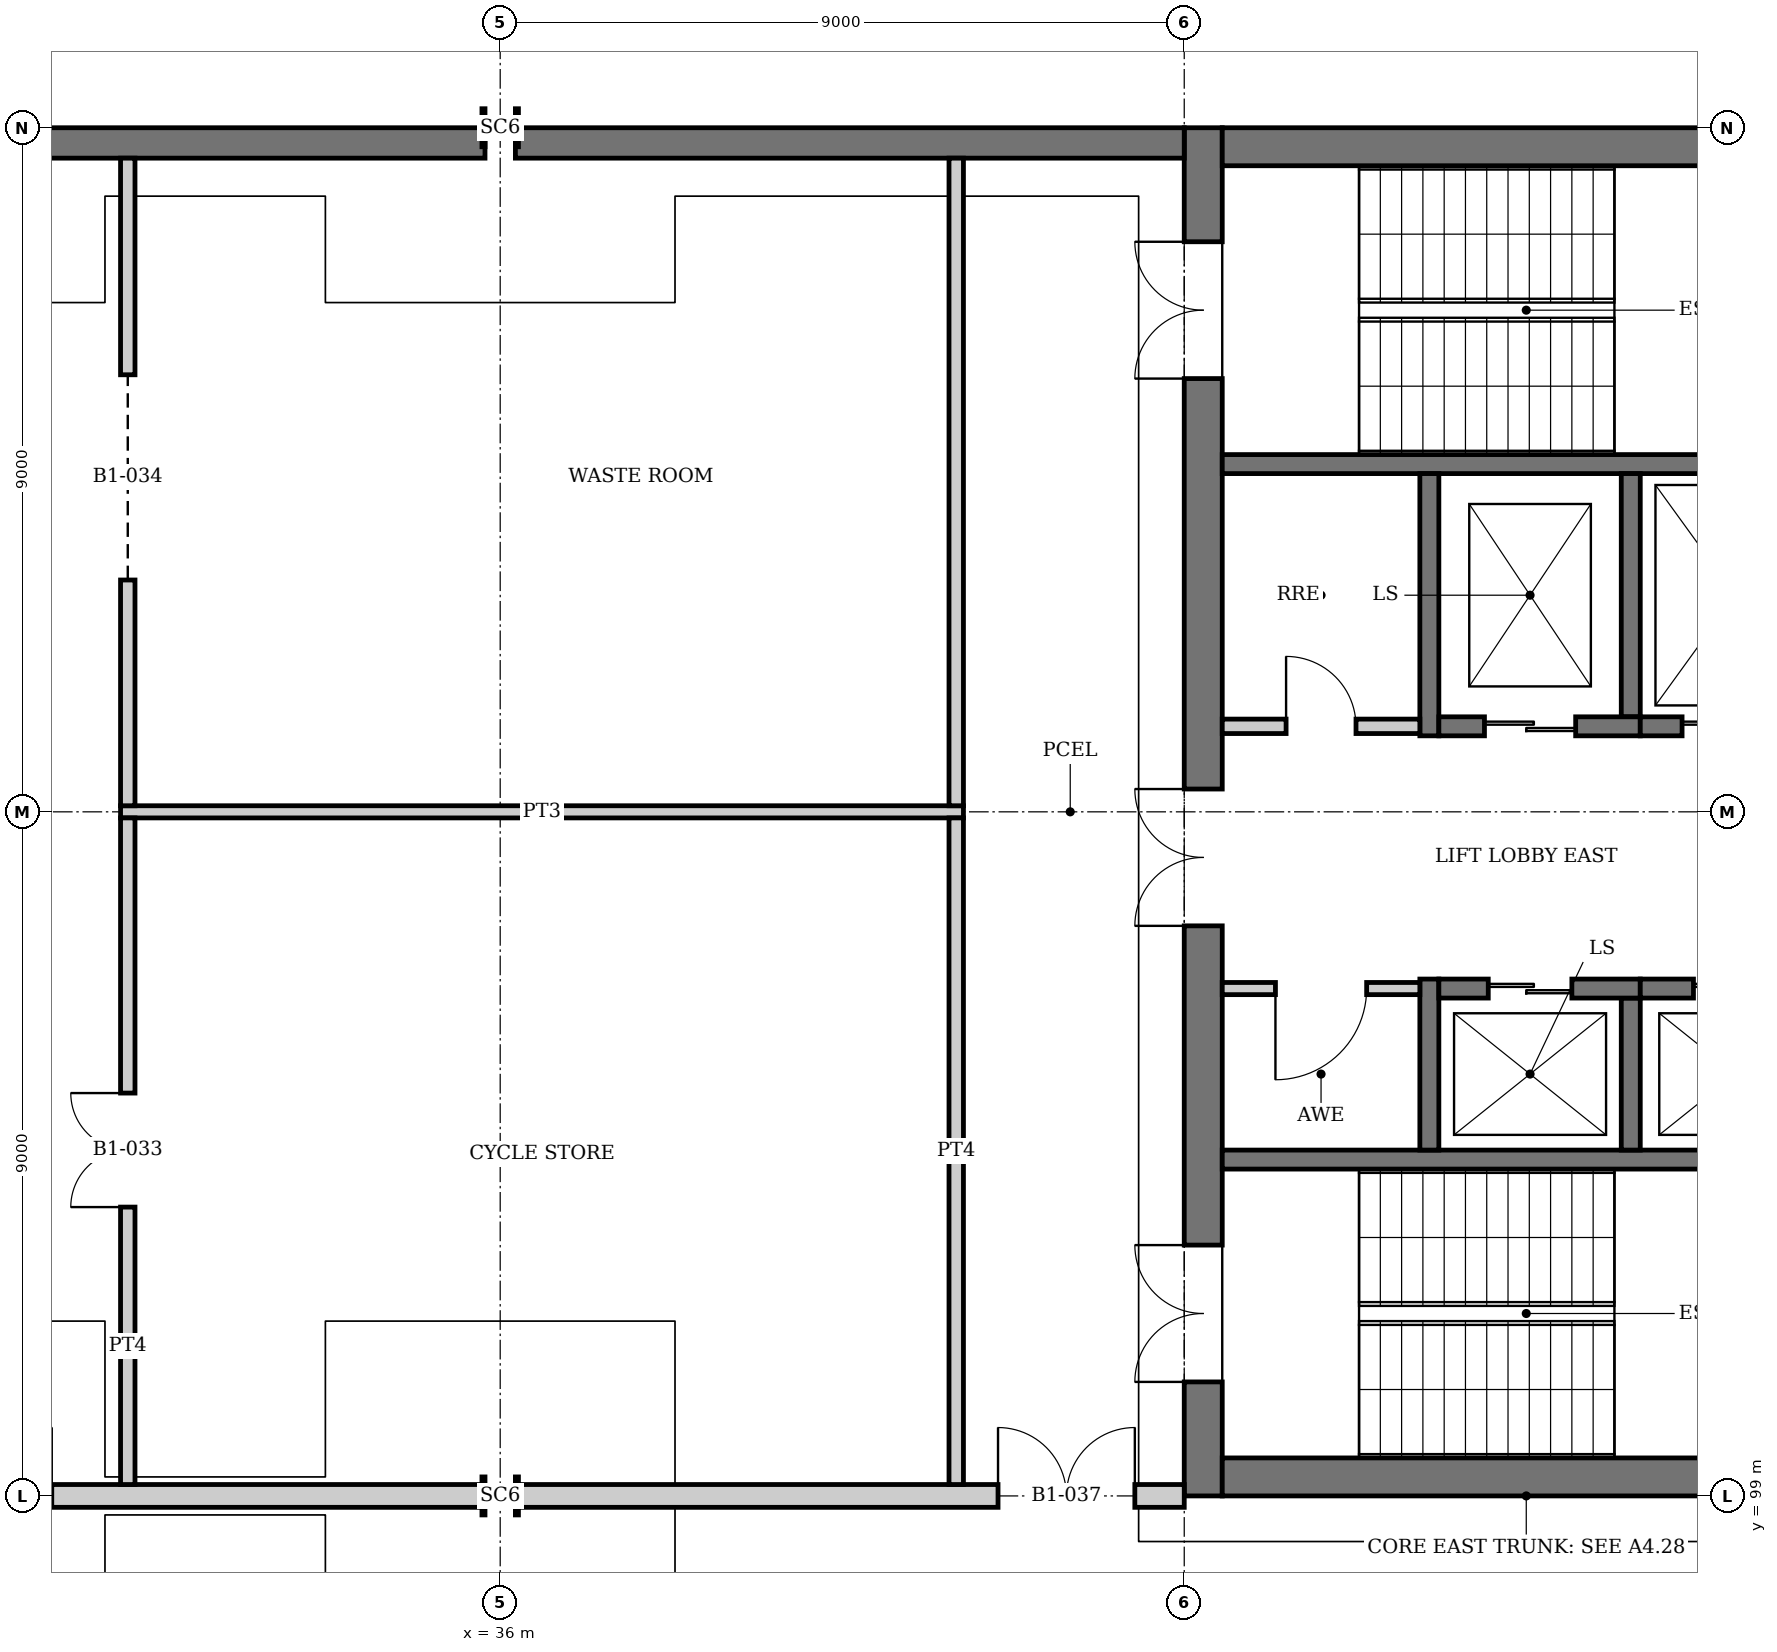
"""IFC4 building model, lengths in metres.
Left out: names, types, materials, properties, quantities, classifications, styles, units other than length and angle.
Written with IfcOpenShell. Run it as: python <this file> out.ifc"""

import sys

from ifc_helpers import new_model, si_unit, direction, frame, frame_2d, origin, origin_2d, place, context, subcontext, project, spatial, rectangle, i_section, extrude, element, fill, save


model = new_model("IFC4")
c1 = context("Model", 3, precision=1e-05, world=origin(), true_north=direction((0.0, 1.0)))
c2 = subcontext(c1, "Body", "Model", "MODEL_VIEW")
j1 = project(units=[si_unit("LENGTHUNIT", "METRE"), si_unit("PLANEANGLEUNIT", "RADIAN")], contexts=[c1])
p1 = place(None, origin())
s1 = spatial("IfcSite", under=j1, at=p1, CompositionType="ELEMENT")
p2 = place(p1, origin())
s2 = spatial("IfcBuilding", under=s1, at=p2, CompositionType="ELEMENT")
p3 = place(p2, frame((0.0, 0.0, -4.5)))
s3 = spatial("IfcBuildingStorey", under=s2, at=p3, CompositionType="ELEMENT", Elevation=-4.5)
for number, where, z_axis, x_axis in (
    (1, (36.0, 99.0, 0.0), (0.0, 0.0, 1.0), (0.0, 1.0, 0.0)),
    (2, (36.0, 117.0, 0.0), (0.0, 0.0, 1.0), (0.0, 1.0, 0.0)),
):
    element("IfcColumn", number, at=place(p3, frame(where, z_axis=z_axis, x_axis=x_axis)), inside=s3, PredefinedType="COLUMN", context=c2, shape_type="SweptSolid", body=[
        extrude(i_section(OverallWidth=0.5, OverallDepth=0.48, WebThickness=0.04, FlangeThickness=0.04, at=origin_2d()), origin(), (0.0, 0.0, 1.0), 4.5),
    ])
p4 = place(p3, frame((45.25, 99.0, 0.0), z_axis=(0.0, 0.0, 1.0), x_axis=(0.0, 1.0, 0.0)))
e3 = element("IfcWall", 3, at=p4, inside=s3, PredefinedType="SHEAR", context=c2, shape_type="SweptSolid", body=[
    extrude(rectangle(XDim=18.0, YDim=0.5, at=frame_2d((9.0, 0.0))), origin(), (0.0, 0.0, 1.0), 4.5),
])
p5 = place(p4, frame((1.5, 0.0, 0.0)))
e4 = element("IfcOpeningElement", 4, at=p5, cuts=e3, PredefinedType="OPENING", context=c2, shape_type="SweptSolid", body=[
    extrude(rectangle(XDim=1.8, YDim=2.1, at=frame_2d((0.9, 1.05))), frame((0.0, 0.26, 0.0), z_axis=(0.0, -1.0, 0.0), x_axis=(1.0, 0.0, 0.0)), (0.0, 0.0, 1.0), 0.52),
])
p6 = place(p4, frame((14.7, 0.0, 0.0)))
e5 = element("IfcOpeningElement", 5, at=p6, cuts=e3, PredefinedType="OPENING", context=c2, shape_type="SweptSolid", body=[
    extrude(rectangle(XDim=1.8, YDim=2.1, at=frame_2d((0.9, 1.05))), frame((0.0, 0.26, 0.0), z_axis=(0.0, -1.0, 0.0), x_axis=(1.0, 0.0, 0.0)), (0.0, 0.0, 1.0), 0.52),
])
p7 = place(p4, frame((7.5, 0.0, 0.0)))
e6 = element("IfcOpeningElement", 6, at=p7, cuts=e3, PredefinedType="OPENING", context=c2, shape_type="SweptSolid", body=[
    extrude(rectangle(XDim=1.8, YDim=2.1, at=frame_2d((0.9, 1.05))), frame((0.0, 0.26, 0.0), z_axis=(0.0, -1.0, 0.0), x_axis=(1.0, 0.0, 0.0)), (0.0, 0.0, 1.0), 0.52),
])
for number, where, z_axis, x_axis in (
    (7, (45.5, 99.25, 0.0), (0.0, 0.0, 1.0), (1.0, 0.0, 0.0)),
    (8, (45.5, 116.75, 0.0), (0.0, 0.0, 1.0), (1.0, 0.0, 0.0)),
):
    element("IfcWall", number, at=place(p3, frame(where, z_axis=z_axis, x_axis=x_axis)), inside=s3, PredefinedType="SHEAR", context=c2, shape_type="SweptSolid", body=[
        extrude(rectangle(XDim=8.0, YDim=0.5, at=frame_2d((4.0, 0.0))), origin(), (0.0, 0.0, 1.0), 4.5),
    ])
p8 = place(p3, frame((27.2, 116.8, 0.0), z_axis=(0.0, 0.0, 1.0), x_axis=(1.0, 0.0, 0.0)))
e9 = element("IfcWall", 9, at=p8, inside=s3, PredefinedType="SOLIDWALL", context=c2, shape_type="SweptSolid", body=[
    extrude(rectangle(XDim=8.6, YDim=0.4, at=frame_2d((4.3, 0.0))), origin(), (0.0, 0.0, 1.0), 4.5),
])
p9 = place(p3, frame((36.2, 116.8, 0.0), z_axis=(0.0, 0.0, 1.0), x_axis=(1.0, 0.0, 0.0)))
e10 = element("IfcWall", 10, at=p9, inside=s3, PredefinedType="SOLIDWALL", context=c2, shape_type="SweptSolid", body=[
    extrude(rectangle(XDim=8.8, YDim=0.4, at=frame_2d((4.4, 0.0))), origin(), (0.0, 0.0, 1.0), 4.5),
])
p10 = place(p3, frame((27.25, 99.0, 0.0), z_axis=(0.0, 0.0, 1.0), x_axis=(1.0, 0.0, 0.0)))
e11 = element("IfcWall", 11, at=p10, inside=s3, PredefinedType="PARTITIONING", context=c2, shape_type="SweptSolid", body=[
    extrude(rectangle(XDim=8.5, YDim=0.3, at=frame_2d((4.25, 0.0))), origin(), (0.0, 0.0, 1.0), 3.34),
])
p11 = place(p10, frame((1.05, 0.0, 0.0)))
e12 = element("IfcOpeningElement", 12, at=p11, cuts=e11, PredefinedType="OPENING", context=c2, shape_type="SweptSolid", body=[
    extrude(rectangle(XDim=1.8, YDim=2.1, at=frame_2d((0.9, 1.05))), frame((0.0, 0.16, 0.0), z_axis=(0.0, -1.0, 0.0), x_axis=(1.0, 0.0, 0.0)), (0.0, 0.0, 1.0), 0.32),
])
p12 = place(p3, frame((36.25, 99.0, 0.0), z_axis=(0.0, 0.0, 1.0), x_axis=(1.0, 0.0, 0.0)))
e13 = element("IfcWall", 13, at=p12, inside=s3, PredefinedType="PARTITIONING", context=c2, shape_type="SweptSolid", body=[
    extrude(rectangle(XDim=8.75, YDim=0.3, at=frame_2d((4.375, 0.0))), origin(), (0.0, 0.0, 1.0), 3.34),
])
p13 = place(p12, frame((6.3, 0.0, 0.0)))
e14 = element("IfcOpeningElement", 14, at=p13, cuts=e13, PredefinedType="OPENING", context=c2, shape_type="SweptSolid", body=[
    extrude(rectangle(XDim=1.8, YDim=2.1, at=frame_2d((0.9, 1.05))), frame((0.0, 0.16, 0.0), z_axis=(0.0, -1.0, 0.0), x_axis=(1.0, 0.0, 0.0)), (0.0, 0.0, 1.0), 0.32),
])
p14 = place(p3, frame((31.005, 108.0, 0.0), z_axis=(0.0, 0.0, 1.0), x_axis=(1.0, 0.0, 0.0)))
e15 = element("IfcWall", 15, at=p14, inside=s3, PredefinedType="PARTITIONING", context=c2, shape_type="SweptSolid", body=[
    extrude(rectangle(XDim=11.09, YDim=0.16, at=frame_2d((5.545, 0.0))), origin(), (0.0, 0.0, 1.0), 3.35),
])
p15 = place(p3, frame((31.1, 99.15, 0.0), z_axis=(0.0, 0.0, 1.0), x_axis=(0.0, 1.0, 0.0)))
e16 = element("IfcWall", 16, at=p15, inside=s3, PredefinedType="PARTITIONING", context=c2, shape_type="SweptSolid", body=[
    extrude(rectangle(XDim=8.77, YDim=0.19, at=frame_2d((4.385, 0.0))), origin(), (0.0, 0.0, 1.0), 3.34),
])
p16 = place(p15, frame((3.65, 0.0, 0.0)))
e17 = element("IfcOpeningElement", 17, at=p16, cuts=e16, PredefinedType="OPENING", context=c2, shape_type="SweptSolid", body=[
    extrude(rectangle(XDim=1.5, YDim=2.1, at=frame_2d((0.75, 1.05))), frame((0.0, 0.105, 0.0), z_axis=(0.0, -1.0, 0.0), x_axis=(1.0, 0.0, 0.0)), (0.0, 0.0, 1.0), 0.21),
])
p17 = place(p3, frame((31.1, 108.08, 0.0), z_axis=(0.0, 0.0, 1.0), x_axis=(0.0, 1.0, 0.0)))
e18 = element("IfcWall", 18, at=p17, inside=s3, PredefinedType="PARTITIONING", context=c2, shape_type="SweptSolid", body=[
    extrude(rectangle(XDim=8.52, YDim=0.19, at=frame_2d((4.26, 0.0))), origin(), (0.0, 0.0, 1.0), 4.25),
])
p18 = place(p17, frame((2.97, 0.0, 0.0)))
e19 = element("IfcOpeningElement", 19, at=p18, cuts=e18, PredefinedType="OPENING", context=c2, shape_type="SweptSolid", body=[
    extrude(rectangle(XDim=2.7, YDim=3.0, at=frame_2d((1.35, 1.5))), frame((0.0, 0.105, 0.0), z_axis=(0.0, -1.0, 0.0), x_axis=(1.0, 0.0, 0.0)), (0.0, 0.0, 1.0), 0.21),
])
p19 = place(p3, frame((42.0, 99.15, 0.0), z_axis=(0.0, 0.0, 1.0), x_axis=(0.0, 1.0, 0.0)))
e20 = element("IfcWall", 20, at=p19, inside=s3, PredefinedType="PARTITIONING", context=c2, shape_type="SweptSolid", body=[
    extrude(rectangle(XDim=8.77, YDim=0.19, at=frame_2d((4.385, 0.0))), origin(), (0.0, 0.0, 1.0), 3.34),
])
p20 = place(p3, frame((42.0, 108.08, 0.0), z_axis=(0.0, 0.0, 1.0), x_axis=(0.0, 1.0, 0.0)))
e21 = element("IfcWall", 21, at=p20, inside=s3, PredefinedType="PARTITIONING", context=c2, shape_type="SweptSolid", body=[
    extrude(rectangle(XDim=8.52, YDim=0.19, at=frame_2d((4.26, 0.0))), origin(), (0.0, 0.0, 1.0), 4.25),
])
for number, where, z_axis, x_axis in (
    (22, (45.5, 103.425, 0.0), (0.0, 0.0, 1.0), (1.0, 0.0, 0.0)),
    (23, (45.5, 112.575, 0.0), (0.0, 0.0, 1.0), (1.0, 0.0, 0.0)),
):
    element("IfcWall", number, at=place(p3, frame(where, z_axis=z_axis, x_axis=x_axis)), inside=s3, PredefinedType="SOLIDWALL", context=c2, shape_type="SweptSolid", body=[
        extrude(rectangle(XDim=8.0, YDim=0.25, at=frame_2d((4.0, 0.0))), origin(), (0.0, 0.0, 1.0), 4.25),
    ])
p21 = place(p3, frame((48.225, 103.55, 0.0), z_axis=(0.0, 0.0, 1.0), x_axis=(0.0, 1.0, 0.0)))
e24 = element("IfcWall", 24, at=p21, inside=s3, PredefinedType="SOLIDWALL", context=c2, shape_type="SweptSolid", body=[
    extrude(rectangle(XDim=2.25, YDim=0.25, at=frame_2d((1.125, 0.0))), origin(), (0.0, 0.0, 1.0), 4.5),
])
p22 = place(p3, frame((50.875, 103.55, 0.0), z_axis=(0.0, 0.0, 1.0), x_axis=(0.0, 1.0, 0.0)))
e25 = element("IfcWall", 25, at=p22, inside=s3, PredefinedType="SOLIDWALL", context=c2, shape_type="SweptSolid", body=[
    extrude(rectangle(XDim=2.0, YDim=0.25, at=frame_2d((1.0, 0.0))), origin(), (0.0, 0.0, 1.0), 4.5),
])
p23 = place(p3, frame((48.35, 105.675, 0.0), z_axis=(0.0, 0.0, 1.0), x_axis=(1.0, 0.0, 0.0)))
e26 = element("IfcWall", 26, at=p23, inside=s3, PredefinedType="SOLIDWALL", context=c2, shape_type="SweptSolid", body=[
    extrude(rectangle(XDim=2.65, YDim=0.25, at=frame_2d((1.325, 0.0))), origin(), (0.0, 0.0, 1.0), 4.5),
])
p24 = place(p23, frame((0.65, 0.0, 0.0)))
e27 = element("IfcOpeningElement", 27, at=p24, cuts=e26, PredefinedType="OPENING", context=c2, shape_type="SweptSolid", body=[
    extrude(rectangle(XDim=1.1, YDim=2.1, at=frame_2d((0.55, 1.05))), frame((0.0, 0.135, 0.0), z_axis=(0.0, -1.0, 0.0), x_axis=(1.0, 0.0, 0.0)), (0.0, 0.0, 1.0), 0.27),
])
p25 = place(p3, frame((51.0, 105.675, 0.0), z_axis=(0.0, 0.0, 1.0), x_axis=(1.0, 0.0, 0.0)))
e28 = element("IfcWall", 28, at=p25, inside=s3, PredefinedType="SOLIDWALL", context=c2, shape_type="SweptSolid", body=[
    extrude(rectangle(XDim=2.5, YDim=0.25, at=frame_2d((1.25, 0.0))), origin(), (0.0, 0.0, 1.0), 4.5),
])
p26 = place(p25, frame((0.7, 0.0, 0.0)))
e29 = element("IfcOpeningElement", 29, at=p26, cuts=e28, PredefinedType="OPENING", context=c2, shape_type="SweptSolid", body=[
    extrude(rectangle(XDim=1.1, YDim=2.1, at=frame_2d((0.55, 1.05))), frame((0.0, 0.135, 0.0), z_axis=(0.0, -1.0, 0.0), x_axis=(1.0, 0.0, 0.0)), (0.0, 0.0, 1.0), 0.27),
])
p27 = place(p3, frame((48.225, 109.0, 0.0), z_axis=(0.0, 0.0, 1.0), x_axis=(0.0, 1.0, 0.0)))
e30 = element("IfcWall", 30, at=p27, inside=s3, PredefinedType="SOLIDWALL", context=c2, shape_type="SweptSolid", body=[
    extrude(rectangle(XDim=3.45, YDim=0.25, at=frame_2d((1.725, 0.0))), origin(), (0.0, 0.0, 1.0), 4.5),
])
p28 = place(p3, frame((50.875, 109.25, 0.0), z_axis=(0.0, 0.0, 1.0), x_axis=(0.0, 1.0, 0.0)))
e31 = element("IfcWall", 31, at=p28, inside=s3, PredefinedType="SOLIDWALL", context=c2, shape_type="SweptSolid", body=[
    extrude(rectangle(XDim=3.2, YDim=0.25, at=frame_2d((1.6, 0.0))), origin(), (0.0, 0.0, 1.0), 4.5),
])
p29 = place(p3, frame((48.35, 109.125, 0.0), z_axis=(0.0, 0.0, 1.0), x_axis=(1.0, 0.0, 0.0)))
e32 = element("IfcWall", 32, at=p29, inside=s3, PredefinedType="SOLIDWALL", context=c2, shape_type="SweptSolid", body=[
    extrude(rectangle(XDim=2.65, YDim=0.25, at=frame_2d((1.325, 0.0))), origin(), (0.0, 0.0, 1.0), 4.5),
])
p30 = place(p29, frame((0.6, 0.0, 0.0)))
e33 = element("IfcOpeningElement", 33, at=p30, cuts=e32, PredefinedType="OPENING", context=c2, shape_type="SweptSolid", body=[
    extrude(rectangle(XDim=1.2, YDim=2.1, at=frame_2d((0.6, 1.05))), frame((0.0, 0.135, 0.0), z_axis=(0.0, -1.0, 0.0), x_axis=(1.0, 0.0, 0.0)), (0.0, 0.0, 1.0), 0.27),
])
p31 = place(p3, frame((51.0, 109.125, 0.0), z_axis=(0.0, 0.0, 1.0), x_axis=(1.0, 0.0, 0.0)))
e34 = element("IfcWall", 34, at=p31, inside=s3, PredefinedType="SOLIDWALL", context=c2, shape_type="SweptSolid", body=[
    extrude(rectangle(XDim=2.5, YDim=0.25, at=frame_2d((1.25, 0.0))), origin(), (0.0, 0.0, 1.0), 4.5),
])
p32 = place(p31, frame((0.55, 0.0, 0.0)))
e35 = element("IfcOpeningElement", 35, at=p32, cuts=e34, PredefinedType="OPENING", context=c2, shape_type="SweptSolid", body=[
    extrude(rectangle(XDim=1.4, YDim=2.4, at=frame_2d((0.7, 1.2))), frame((0.0, 0.135, 0.0), z_axis=(0.0, -1.0, 0.0), x_axis=(1.0, 0.0, 0.0)), (0.0, 0.0, 1.0), 0.27),
])
p33 = place(p3, frame((45.5, 105.675, 0.0), z_axis=(0.0, 0.0, 1.0), x_axis=(1.0, 0.0, 0.0)))
e36 = element("IfcWall", 36, at=p33, inside=s3, PredefinedType="PARTITIONING", context=c2, shape_type="SweptSolid", body=[
    extrude(rectangle(XDim=2.6, YDim=0.16, at=frame_2d((1.3, 0.0))), origin(), (0.0, 0.0, 1.0), 4.25),
])
p34 = place(p33, frame((0.7, 0.0, 0.0)))
e37 = element("IfcOpeningElement", 37, at=p34, cuts=e36, PredefinedType="OPENING", context=c2, shape_type="SweptSolid", body=[
    extrude(rectangle(XDim=1.2, YDim=2.1, at=frame_2d((0.6, 1.05))), frame((0.0, 0.09, 0.0), z_axis=(0.0, -1.0, 0.0), x_axis=(1.0, 0.0, 0.0)), (0.0, 0.0, 1.0), 0.18),
])
p35 = place(p3, frame((45.5, 109.125, 0.0), z_axis=(0.0, 0.0, 1.0), x_axis=(1.0, 0.0, 0.0)))
e38 = element("IfcWall", 38, at=p35, inside=s3, PredefinedType="PARTITIONING", context=c2, shape_type="SweptSolid", body=[
    extrude(rectangle(XDim=2.6, YDim=0.19, at=frame_2d((1.3, 0.0))), origin(), (0.0, 0.0, 1.0), 4.25),
])
p36 = place(p35, frame((0.84, 0.0, 0.0)))
e39 = element("IfcOpeningElement", 39, at=p36, cuts=e38, PredefinedType="OPENING", context=c2, shape_type="SweptSolid", body=[
    extrude(rectangle(XDim=0.92, YDim=2.1, at=frame_2d((0.46, 1.05))), frame((0.0, 0.105, 0.0), z_axis=(0.0, -1.0, 0.0), x_axis=(1.0, 0.0, 0.0)), (0.0, 0.0, 1.0), 0.21),
])
p37 = place(p16, origin())
e40 = element("IfcDoor", 40, at=p37, inside=s3, OperationType="DOUBLE_DOOR_SINGLE_SWING", PredefinedType="DOOR", context=c2, shape_type="SweptSolid", body=[
    extrude(rectangle(XDim=1.5, YDim=2.1, at=frame_2d((0.75, 1.05))), frame((0.0, 0.025, 0.0), z_axis=(0.0, -1.0, 0.0), x_axis=(1.0, 0.0, 0.0)), (0.0, 0.0, 1.0), 0.05),
])
fill(e17, e40)
p38 = place(p18, origin())
e41 = element("IfcDoor", 41, at=p38, inside=s3, OperationType="ROLLINGUP", PredefinedType="DOOR", context=c2, shape_type="SweptSolid", body=[
    extrude(rectangle(XDim=2.7, YDim=3.0, at=frame_2d((1.35, 1.5))), frame((0.0, 0.025, 0.0), z_axis=(0.0, -1.0, 0.0), x_axis=(1.0, 0.0, 0.0)), (0.0, 0.0, 1.0), 0.05),
])
fill(e19, e41)
p39 = place(p13, origin())
e42 = element("IfcDoor", 42, at=p39, inside=s3, OperationType="DOUBLE_DOOR_SINGLE_SWING", PredefinedType="DOOR", context=c2, shape_type="SweptSolid", body=[
    extrude(rectangle(XDim=1.8, YDim=2.1, at=frame_2d((0.9, 1.05))), frame((0.0, 0.025, 0.0), z_axis=(0.0, -1.0, 0.0), x_axis=(1.0, 0.0, 0.0)), (0.0, 0.0, 1.0), 0.05),
])
fill(e14, e42)
p40 = place(p24, origin())
e43 = element("IfcDoor", 43, at=p40, inside=s3, OperationType="DOUBLE_DOOR_SLIDING", PredefinedType="DOOR", context=c2, shape_type="SweptSolid", body=[
    extrude(rectangle(XDim=1.1, YDim=2.1, at=frame_2d((0.55, 1.05))), frame((0.0, 0.025, 0.0), z_axis=(0.0, -1.0, 0.0), x_axis=(1.0, 0.0, 0.0)), (0.0, 0.0, 1.0), 0.05),
])
fill(e27, e43)
p41 = place(p26, origin())
e44 = element("IfcDoor", 44, at=p41, inside=s3, OperationType="DOUBLE_DOOR_SLIDING", PredefinedType="DOOR", context=c2, shape_type="SweptSolid", body=[
    extrude(rectangle(XDim=1.1, YDim=2.1, at=frame_2d((0.55, 1.05))), frame((0.0, 0.025, 0.0), z_axis=(0.0, -1.0, 0.0), x_axis=(1.0, 0.0, 0.0)), (0.0, 0.0, 1.0), 0.05),
])
fill(e29, e44)
p42 = place(p30, origin())
e45 = element("IfcDoor", 45, at=p42, inside=s3, OperationType="DOUBLE_DOOR_SLIDING", PredefinedType="DOOR", context=c2, shape_type="SweptSolid", body=[
    extrude(rectangle(XDim=1.2, YDim=2.1, at=frame_2d((0.6, 1.05))), frame((0.0, 0.025, 0.0), z_axis=(0.0, -1.0, 0.0), x_axis=(1.0, 0.0, 0.0)), (0.0, 0.0, 1.0), 0.05),
])
fill(e33, e45)
p43 = place(p32, origin())
e46 = element("IfcDoor", 46, at=p43, inside=s3, OperationType="DOUBLE_DOOR_SLIDING", PredefinedType="DOOR", context=c2, shape_type="SweptSolid", body=[
    extrude(rectangle(XDim=1.4, YDim=2.4, at=frame_2d((0.7, 1.2))), frame((0.0, 0.025, 0.0), z_axis=(0.0, -1.0, 0.0), x_axis=(1.0, 0.0, 0.0)), (0.0, 0.0, 1.0), 0.05),
])
fill(e35, e46)
p44 = place(p5, origin())
e47 = element("IfcDoor", 47, at=p44, inside=s3, OperationType="DOUBLE_DOOR_SINGLE_SWING", PredefinedType="DOOR", context=c2, shape_type="SweptSolid", body=[
    extrude(rectangle(XDim=1.8, YDim=2.1, at=frame_2d((0.9, 1.05))), frame((0.0, 0.025, 0.0), z_axis=(0.0, -1.0, 0.0), x_axis=(1.0, 0.0, 0.0)), (0.0, 0.0, 1.0), 0.05),
])
fill(e4, e47)
p45 = place(p6, origin())
e48 = element("IfcDoor", 48, at=p45, inside=s3, OperationType="DOUBLE_DOOR_SINGLE_SWING", PredefinedType="DOOR", context=c2, shape_type="SweptSolid", body=[
    extrude(rectangle(XDim=1.8, YDim=2.1, at=frame_2d((0.9, 1.05))), frame((0.0, 0.025, 0.0), z_axis=(0.0, -1.0, 0.0), x_axis=(1.0, 0.0, 0.0)), (0.0, 0.0, 1.0), 0.05),
])
fill(e5, e48)
p46 = place(p7, origin())
e49 = element("IfcDoor", 49, at=p46, inside=s3, OperationType="DOUBLE_DOOR_SINGLE_SWING", PredefinedType="DOOR", context=c2, shape_type="SweptSolid", body=[
    extrude(rectangle(XDim=1.8, YDim=2.1, at=frame_2d((0.9, 1.05))), frame((0.0, 0.025, 0.0), z_axis=(0.0, -1.0, 0.0), x_axis=(1.0, 0.0, 0.0)), (0.0, 0.0, 1.0), 0.05),
])
fill(e6, e49)
p47 = place(p34, frame((1.2, 0.0, 0.0), z_axis=(0.0, 0.0, 1.0), x_axis=(-1.0, 0.0, 0.0)))
e50 = element("IfcDoor", 50, at=p47, inside=s3, OperationType="SINGLE_SWING_RIGHT", PredefinedType="DOOR", context=c2, shape_type="SweptSolid", body=[
    extrude(rectangle(XDim=1.2, YDim=2.1, at=frame_2d((0.6, 1.05))), frame((0.0, 0.025, 0.0), z_axis=(0.0, -1.0, 0.0), x_axis=(1.0, 0.0, 0.0)), (0.0, 0.0, 1.0), 0.05),
])
fill(e37, e50)
p48 = place(p36, origin())
e51 = element("IfcDoor", 51, at=p48, inside=s3, OperationType="SINGLE_SWING_LEFT", PredefinedType="DOOR", context=c2, shape_type="SweptSolid", body=[
    extrude(rectangle(XDim=0.92, YDim=2.1, at=frame_2d((0.46, 1.05))), frame((0.0, 0.025, 0.0), z_axis=(0.0, -1.0, 0.0), x_axis=(1.0, 0.0, 0.0)), (0.0, 0.0, 1.0), 0.05),
])
fill(e39, e51)
save(model, sys.argv[1])
